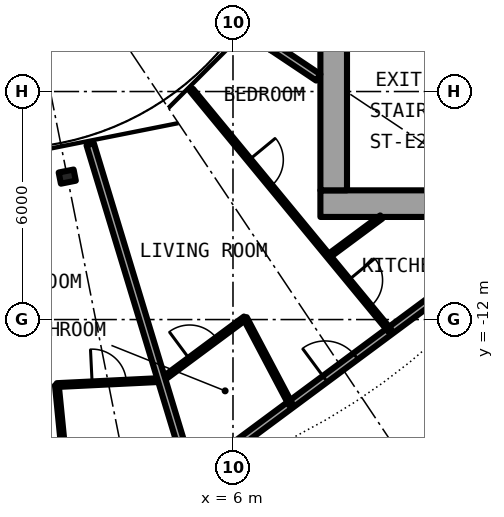
"""IFC4 building model, lengths in metres.
Left out: names, types, materials, properties, quantities, classifications, styles, units other than length and angle.
Written with IfcOpenShell. Run it as: python <this file> out.ifc"""

import sys

from ifc_helpers import new_model, si_unit, direction, frame, frame_2d, origin, origin_2d, place, context, subcontext, project, spatial, rectangle, i_section, extrude, element, fill, save


model = new_model("IFC4")
c1 = context("Model", 3, precision=1e-05, world=origin(), true_north=direction((0.0, 1.0)))
c2 = subcontext(c1, "Body", "Model", "MODEL_VIEW")
j1 = project(units=[si_unit("LENGTHUNIT", "METRE"), si_unit("PLANEANGLEUNIT", "RADIAN")], contexts=[c1])
p1 = place(None, origin())
s1 = spatial("IfcSite", under=j1, at=p1, CompositionType="ELEMENT")
p2 = place(p1, origin())
s2 = spatial("IfcBuilding", under=s1, at=p2, CompositionType="ELEMENT")
p3 = place(p2, frame((0.0, 0.0, 88.0)))
s3 = spatial("IfcBuildingStorey", under=s2, at=p3, CompositionType="ELEMENT", Elevation=88.0)
p4 = place(p3, frame((1.639, -8.239, 0.0), z_axis=(0.0, 0.0, 1.0), x_axis=(0.195090322016, -0.980785280403, 0.0)))
e1 = element("IfcColumn", 1, at=p4, inside=s3, PredefinedType="COLUMN", context=c2, shape_type="SweptSolid", body=[
    extrude(i_section(OverallWidth=0.3, OverallDepth=0.4, WebThickness=0.013, FlangeThickness=0.024, FilletRadius=0.027, at=origin_2d()), origin(), (0.0, 0.0, 1.0), 3.05),
])
p5 = place(p3, frame((8.3, -8.95, 0.0), z_axis=(0.0, 0.0, 1.0), x_axis=(1.0, 0.0, 0.0)))
e2 = element("IfcWall", 2, at=p5, inside=s3, PredefinedType="SHEAR", context=c2, shape_type="SweptSolid", body=[
    extrude(rectangle(XDim=14.0, YDim=0.7, at=frame_2d((7.0, 0.0))), origin(), (0.0, 0.0, 1.0), 3.05),
])
p6 = place(p5, frame((11.575, 0.0, 0.0)))
e3 = element("IfcOpeningElement", 3, at=p6, cuts=e2, PredefinedType="OPENING", context=c2, shape_type="SweptSolid", body=[
    extrude(rectangle(XDim=1.2, YDim=2.3, at=frame_2d((0.6, 1.15))), frame((0.0, 0.36, 0.0), z_axis=(0.0, -1.0, 0.0), x_axis=(1.0, 0.0, 0.0)), (0.0, 0.0, 1.0), 0.72),
])
p7 = place(p3, frame((8.65, -8.6, 0.0), z_axis=(0.0, 0.0, 1.0), x_axis=(0.0, 1.0, 0.0)))
e4 = element("IfcWall", 4, at=p7, inside=s3, PredefinedType="SHEAR", context=c2, shape_type="SweptSolid", body=[
    extrude(rectangle(XDim=17.2, YDim=0.7, at=frame_2d((8.6, 0.0))), origin(), (0.0, 0.0, 1.0), 3.05),
])
p8 = place(p7, frame((7.4, 0.0, 0.1)))
e5 = element("IfcOpeningElement", 5, at=p8, cuts=e4, PredefinedType="OPENING", context=c2, shape_type="SweptSolid", body=[
    extrude(rectangle(XDim=2.4, YDim=2.2, at=frame_2d((1.2, 1.1))), frame((0.0, 0.36, 0.0), z_axis=(0.0, -1.0, 0.0), x_axis=(1.0, 0.0, 0.0)), (0.0, 0.0, 1.0), 0.72),
])
p9 = place(p3, frame((11.0, -16.186, 0.0), z_axis=(0.0, 0.0, 1.0), x_axis=(0.707106781187, 0.707106781187, 0.0)))
e6 = element("IfcWall", 6, at=p9, inside=s3, PredefinedType="PARTITIONING", context=c2, shape_type="SweptSolid", body=[
    extrude(rectangle(XDim=7.334, YDim=0.2, at=frame_2d((3.667, 0.0))), origin(), (0.0, 0.0, 1.0), 2.38),
])
p10 = place(p9, frame((4.123, 0.0, 0.0)))
e7 = element("IfcOpeningElement", 7, at=p10, cuts=e6, PredefinedType="OPENING", context=c2, shape_type="SweptSolid", body=[
    extrude(rectangle(XDim=1.0, YDim=2.3, at=frame_2d((0.5, 1.15))), frame((0.0, 0.11, 0.0), z_axis=(0.0, -1.0, 0.0), x_axis=(1.0, 0.0, 0.0)), (0.0, 0.0, 1.0), 0.22),
])
p11 = place(p3, frame((4.906, -16.172, 0.0), z_axis=(0.0, 0.0, 1.0), x_axis=(0.803191461888, 0.595720971219, 0.0)))
e8 = element("IfcWall", 8, at=p11, inside=s3, PredefinedType="PARTITIONING", context=c2, shape_type="SweptSolid", body=[
    extrude(rectangle(XDim=9.76, YDim=0.2, at=frame_2d((4.88, 0.0))), origin(), (0.0, 0.0, 1.0), 2.7),
])
p12 = place(p11, frame((4.38, 0.0, 0.0)))
e9 = element("IfcOpeningElement", 9, at=p12, cuts=e8, PredefinedType="OPENING", context=c2, shape_type="SweptSolid", body=[
    extrude(rectangle(XDim=1.0, YDim=2.3, at=frame_2d((0.5, 1.15))), frame((0.0, 0.11, 0.0), z_axis=(0.0, -1.0, 0.0), x_axis=(1.0, 0.0, 0.0)), (0.0, 0.0, 1.0), 0.22),
])
p13 = place(p3, frame((1.365, -13.724, 0.0), z_axis=(0.0, 0.0, 1.0), x_axis=(0.99880320044, 0.048909782152, 0.0)))
e10 = element("IfcWall", 10, at=p13, inside=s3, PredefinedType="PARTITIONING", context=c2, shape_type="SweptSolid", body=[
    extrude(rectangle(XDim=2.76, YDim=0.1, at=frame_2d((1.38, 0.0))), origin(), (0.0, 0.0, 1.0), 2.7),
])
p14 = place(p13, frame((0.93, 0.0, 0.0)))
e11 = element("IfcOpeningElement", 11, at=p14, cuts=e10, PredefinedType="OPENING", context=c2, shape_type="SweptSolid", body=[
    extrude(rectangle(XDim=0.9, YDim=2.3, at=frame_2d((0.45, 1.15))), frame((0.0, 0.06, 0.0), z_axis=(0.0, -1.0, 0.0), x_axis=(1.0, 0.0, 0.0)), (0.0, 0.0, 1.0), 0.12),
])
p15 = place(p3, frame((4.123, -13.589, 0.0), z_axis=(0.0, 0.0, 1.0), x_axis=(0.803128348509, 0.595806055542, 0.0)))
e12 = element("IfcWall", 12, at=p15, inside=s3, PredefinedType="PARTITIONING", context=c2, shape_type="SweptSolid", body=[
    extrude(rectangle(XDim=2.734, YDim=0.1, at=frame_2d((1.367, 0.0))), origin(), (0.0, 0.0, 1.0), 2.7),
])
p16 = place(p15, frame((0.916, 0.0, 0.0)))
e13 = element("IfcOpeningElement", 13, at=p16, cuts=e12, PredefinedType="OPENING", context=c2, shape_type="SweptSolid", body=[
    extrude(rectangle(XDim=0.9, YDim=2.3, at=frame_2d((0.45, 1.15))), frame((0.0, 0.06, 0.0), z_axis=(0.0, -1.0, 0.0), x_axis=(1.0, 0.0, 0.0)), (0.0, 0.0, 1.0), 0.12),
])
p17 = place(p3, frame((8.513, -10.332, 0.0), z_axis=(0.0, 0.0, 1.0), x_axis=(0.803135014325, 0.595797070121, 0.0)))
e14 = element("IfcWall", 14, at=p17, inside=s3, PredefinedType="PARTITIONING", context=c2, shape_type="SweptSolid", body=[
    extrude(rectangle(XDim=1.732, YDim=0.1, at=frame_2d((0.866, 0.0))), origin(), (0.0, 0.0, 1.0), 2.7),
])
p18 = place(p3, frame((6.513, -4.472, 0.0), z_axis=(0.0, 0.0, 1.0), x_axis=(0.831382204863, -0.555701025225, 0.0)))
e15 = element("IfcWall", 15, at=p18, inside=s3, PredefinedType="PARTITIONING", context=c2, shape_type="SweptSolid", body=[
    extrude(rectangle(XDim=2.082, YDim=0.2, at=frame_2d((1.041, 0.0))), origin(), (0.0, 0.0, 1.0), 2.7),
])
p19 = place(p3, frame((1.365, -13.724, 0.0), z_axis=(0.0, 0.0, 1.0), x_axis=(0.099171803948, -0.995070325807, 0.0)))
e16 = element("IfcWall", 16, at=p19, inside=s3, PredefinedType="PARTITIONING", context=c2, shape_type="SweptSolid", body=[
    extrude(rectangle(XDim=2.622, YDim=0.1, at=frame_2d((1.311, 0.0))), origin(), (0.0, 0.0, 1.0), 2.7),
])
p20 = place(p3, frame((2.242, -7.388, 0.0), z_axis=(0.0, 0.0, 1.0), x_axis=(0.290225889812, -0.956958166736, 0.0)))
e17 = element("IfcWall", 17, at=p20, inside=s3, PredefinedType="PARTITIONING", context=c2, shape_type="SweptSolid", body=[
    extrude(rectangle(XDim=9.179, YDim=0.2, at=frame_2d((4.59, 0.0))), origin(), (0.0, 0.0, 1.0), 2.7),
])
p21 = place(p3, frame((4.908, -5.959, 0.0), z_axis=(0.0, 0.0, 1.0), x_axis=(0.636105207978, -0.771602335652, 0.0)))
e18 = element("IfcWall", 18, at=p21, inside=s3, PredefinedType="PARTITIONING", context=c2, shape_type="SweptSolid", body=[
    extrude(rectangle(XDim=8.213, YDim=0.1, at=frame_2d((4.106, 0.0))), origin(), (0.0, 0.0, 1.0), 2.7),
])
p22 = place(p21, frame((6.49, 0.0, 0.0)))
e19 = element("IfcOpeningElement", 19, at=p22, cuts=e18, PredefinedType="OPENING", context=c2, shape_type="SweptSolid", body=[
    extrude(rectangle(XDim=0.9, YDim=2.3, at=frame_2d((0.45, 1.15))), frame((0.0, 0.06, 0.0), z_axis=(0.0, -1.0, 0.0), x_axis=(1.0, 0.0, 0.0)), (0.0, 0.0, 1.0), 0.12),
])
p23 = place(p21, frame((2.384, 0.0, 0.0)))
e20 = element("IfcOpeningElement", 20, at=p23, cuts=e18, PredefinedType="OPENING", context=c2, shape_type="SweptSolid", body=[
    extrude(rectangle(XDim=0.9, YDim=2.3, at=frame_2d((0.45, 1.15))), frame((0.0, 0.06, 0.0), z_axis=(0.0, -1.0, 0.0), x_axis=(1.0, 0.0, 0.0)), (0.0, 0.0, 1.0), 0.12),
])
p24 = place(p3, frame((6.317, -11.96, 0.0), z_axis=(0.0, 0.0, 1.0), x_axis=(0.466880254022, -0.884320546185, 0.0)))
e21 = element("IfcWall", 21, at=p24, inside=s3, PredefinedType="PARTITIONING", context=c2, shape_type="SweptSolid", body=[
    extrude(rectangle(XDim=2.573, YDim=0.1, at=frame_2d((1.286, 0.0))), origin(), (0.0, 0.0, 1.0), 2.7),
])
p25 = place(p14, origin())
e22 = element("IfcDoor", 22, at=p25, inside=s3, OperationType="SINGLE_SWING_RIGHT", PredefinedType="DOOR", context=c2, shape_type="SweptSolid", body=[
    extrude(rectangle(XDim=0.9, YDim=2.3, at=frame_2d((0.45, 1.15))), frame((0.0, 0.025, 0.0), z_axis=(0.0, -1.0, 0.0), x_axis=(1.0, 0.0, 0.0)), (0.0, 0.0, 1.0), 0.05),
])
fill(e11, e22)
p26 = place(p12, origin())
e23 = element("IfcDoor", 23, at=p26, inside=s3, OperationType="SINGLE_SWING_LEFT", PredefinedType="DOOR", context=c2, shape_type="SweptSolid", body=[
    extrude(rectangle(XDim=1.0, YDim=2.3, at=frame_2d((0.5, 1.15))), frame((0.0, 0.025, 0.0), z_axis=(0.0, -1.0, 0.0), x_axis=(1.0, 0.0, 0.0)), (0.0, 0.0, 1.0), 0.05),
])
fill(e9, e23)
p27 = place(p16, origin())
e24 = element("IfcDoor", 24, at=p27, inside=s3, OperationType="SINGLE_SWING_LEFT", PredefinedType="DOOR", context=c2, shape_type="SweptSolid", body=[
    extrude(rectangle(XDim=0.9, YDim=2.3, at=frame_2d((0.45, 1.15))), frame((0.0, 0.025, 0.0), z_axis=(0.0, -1.0, 0.0), x_axis=(1.0, 0.0, 0.0)), (0.0, 0.0, 1.0), 0.05),
])
fill(e13, e24)
p28 = place(p22, origin())
e25 = element("IfcDoor", 25, at=p28, inside=s3, OperationType="SINGLE_SWING_RIGHT", PredefinedType="DOOR", context=c2, shape_type="SweptSolid", body=[
    extrude(rectangle(XDim=0.9, YDim=2.3, at=frame_2d((0.45, 1.15))), frame((0.0, 0.025, 0.0), z_axis=(0.0, -1.0, 0.0), x_axis=(1.0, 0.0, 0.0)), (0.0, 0.0, 1.0), 0.05),
])
fill(e19, e25)
p29 = place(p23, origin())
e26 = element("IfcDoor", 26, at=p29, inside=s3, OperationType="SINGLE_SWING_LEFT", PredefinedType="DOOR", context=c2, shape_type="SweptSolid", body=[
    extrude(rectangle(XDim=0.9, YDim=2.3, at=frame_2d((0.45, 1.15))), frame((0.0, 0.025, 0.0), z_axis=(0.0, -1.0, 0.0), x_axis=(1.0, 0.0, 0.0)), (0.0, 0.0, 1.0), 0.05),
])
fill(e20, e26)
save(model, sys.argv[1])
